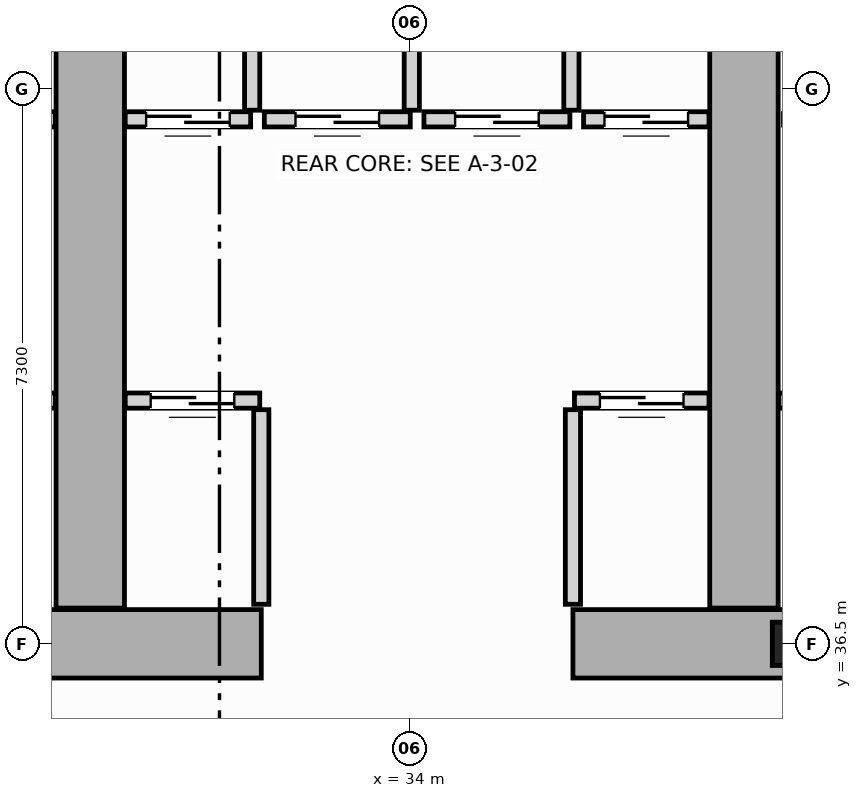
"""IFC4 building model, lengths in metres.
Left out: names, types, materials, properties, quantities, classifications, styles, units other than length and angle.
Written with IfcOpenShell. Run it as: python <this file> out.ifc"""

import sys

from ifc_helpers import new_model, si_unit, direction, frame, frame_2d, origin, origin_2d, place, context, subcontext, project, spatial, rectangle, i_section, extrude, source, transform, mapped, element, fill, save


model = new_model("IFC4")
c1 = context("Model", 3, precision=1e-05, world=origin(), true_north=direction((0.0, 1.0)))
c2 = subcontext(c1, "Body", "Model", "MODEL_VIEW")
j1 = project(units=[si_unit("LENGTHUNIT", "METRE"), si_unit("PLANEANGLEUNIT", "RADIAN")], contexts=[c1])
p1 = place(None, origin())
s1 = spatial("IfcSite", under=j1, at=p1, CompositionType="ELEMENT")
p2 = place(p1, origin())
s2 = spatial("IfcBuilding", under=s1, at=p2, CompositionType="ELEMENT")
p3 = place(p2, origin())
s3 = spatial("IfcBuildingStorey", under=s2, at=p3, CompositionType="ELEMENT", Elevation=0.0)
m1 = source(origin(), c2, "Body", "SweptSolid", [
    extrude(i_section(OverallWidth=0.454, OverallDepth=0.569, WebThickness=0.078, FlangeThickness=0.08, FilletRadius=0.015, at=origin_2d()), origin(), (0.0, 0.0, 1.0), 5.6),
])
p4 = place(p3, frame((39.0, 36.5, 0.0), z_axis=(0.0, 0.0, 1.0), x_axis=(1.0, 0.0, 0.0)))
e1 = element("IfcColumn", 1, at=p4, inside=s3, PredefinedType="COLUMN", context=c2, shape_type="MappedRepresentation", body=[
    mapped(m1, transform((0.0, 0.0, 0.0), scale=1.0)),
])
for number, where, z_axis, x_axis in (
    (2, (27.55, 36.5, 0.0), (0.0, 0.0, 1.0), (1.0, 0.0, 0.0)),
    (3, (36.15, 36.5, 0.0), (0.0, 0.0, 1.0), (1.0, 0.0, 0.0)),
):
    element("IfcWall", number, at=place(p3, frame(where, z_axis=z_axis, x_axis=x_axis)), inside=s3, PredefinedType="SHEAR", context=c2, shape_type="SweptSolid", body=[
        extrude(rectangle(XDim=4.5, YDim=0.9, at=frame_2d((2.25, 0.0))), origin(), (0.0, 0.0, 1.0), 5.6),
    ])
for number, where, z_axis, x_axis in (
    (4, (29.8, 36.97, 0.0), (0.0, 0.0, 1.0), (0.0, 1.0, 0.0)),
    (5, (38.4, 36.97, 0.0), (0.0, 0.0, 1.0), (0.0, 1.0, 0.0)),
):
    element("IfcWall", number, at=place(p3, frame(where, z_axis=z_axis, x_axis=x_axis)), inside=s3, PredefinedType="SHEAR", context=c2, shape_type="SweptSolid", body=[
        extrude(rectangle(XDim=9.23, YDim=0.9, at=frame_2d((4.615, 0.0))), origin(), (0.0, 0.0, 1.0), 5.6),
    ])
p5 = place(p3, frame((27.57, 39.7, 0.0), z_axis=(0.0, 0.0, 1.0), x_axis=(1.0, 0.0, 0.0)))
e6 = element("IfcWall", 6, at=p5, inside=s3, PredefinedType="SOLIDWALL", context=c2, shape_type="SweptSolid", body=[
    extrude(rectangle(XDim=1.77, YDim=0.2, at=frame_2d((0.885, 0.0))), origin(), (0.0, 0.0, 1.0), 5.32),
])
p6 = place(p5, frame((0.335, 0.0, 0.0)))
e7 = element("IfcOpeningElement", 7, at=p6, cuts=e6, PredefinedType="OPENING", context=c2, shape_type="SweptSolid", body=[
    extrude(rectangle(XDim=1.1, YDim=2.15, at=frame_2d((0.55, 1.075))), frame((0.0, 0.11, 0.0), z_axis=(0.0, -1.0, 0.0), x_axis=(1.0, 0.0, 0.0)), (0.0, 0.0, 1.0), 0.22),
])
p7 = place(p3, frame((27.69, 43.4, 0.0), z_axis=(0.0, 0.0, 1.0), x_axis=(1.0, 0.0, 0.0)))
e8 = element("IfcWall", 8, at=p7, inside=s3, PredefinedType="SOLIDWALL", context=c2, shape_type="SweptSolid", body=[
    extrude(rectangle(XDim=1.65, YDim=0.2, at=frame_2d((0.825, 0.0))), origin(), (0.0, 0.0, 1.0), 5.32),
])
p8 = place(p7, frame((0.275, 0.0, 0.0)))
e9 = element("IfcOpeningElement", 9, at=p8, cuts=e8, PredefinedType="OPENING", context=c2, shape_type="SweptSolid", body=[
    extrude(rectangle(XDim=1.1, YDim=2.15, at=frame_2d((0.55, 1.075))), frame((0.0, 0.11, 0.0), z_axis=(0.0, -1.0, 0.0), x_axis=(1.0, 0.0, 0.0)), (0.0, 0.0, 1.0), 0.22),
])
p9 = place(p3, frame((30.26, 39.7, 0.0), z_axis=(0.0, 0.0, 1.0), x_axis=(1.0, 0.0, 0.0)))
e10 = element("IfcWall", 10, at=p9, inside=s3, PredefinedType="SOLIDWALL", context=c2, shape_type="SweptSolid", body=[
    extrude(rectangle(XDim=1.77, YDim=0.2, at=frame_2d((0.885, 0.0))), origin(), (0.0, 0.0, 1.0), 5.32),
])
p10 = place(p9, frame((0.335, 0.0, 0.0)))
e11 = element("IfcOpeningElement", 11, at=p10, cuts=e10, PredefinedType="OPENING", context=c2, shape_type="SweptSolid", body=[
    extrude(rectangle(XDim=1.1, YDim=2.15, at=frame_2d((0.55, 1.075))), frame((0.0, 0.11, 0.0), z_axis=(0.0, -1.0, 0.0), x_axis=(1.0, 0.0, 0.0)), (0.0, 0.0, 1.0), 0.22),
])
p11 = place(p3, frame((32.05, 37.02, 0.0), z_axis=(0.0, 0.0, 1.0), x_axis=(0.0, 1.0, 0.0)))
e12 = element("IfcWall", 12, at=p11, inside=s3, PredefinedType="SOLIDWALL", context=c2, shape_type="SweptSolid", body=[
    extrude(rectangle(XDim=2.56, YDim=0.2, at=frame_2d((1.28, 0.0))), origin(), (0.0, 0.0, 1.0), 5.32),
])
p12 = place(p3, frame((36.17, 39.7, 0.0), z_axis=(0.0, 0.0, 1.0), x_axis=(1.0, 0.0, 0.0)))
e13 = element("IfcWall", 13, at=p12, inside=s3, PredefinedType="SOLIDWALL", context=c2, shape_type="SweptSolid", body=[
    extrude(rectangle(XDim=1.77, YDim=0.2, at=frame_2d((0.885, 0.0))), origin(), (0.0, 0.0, 1.0), 5.32),
])
p13 = place(p12, frame((0.335, 0.0, 0.0)))
e14 = element("IfcOpeningElement", 14, at=p13, cuts=e13, PredefinedType="OPENING", context=c2, shape_type="SweptSolid", body=[
    extrude(rectangle(XDim=1.1, YDim=2.15, at=frame_2d((0.55, 1.075))), frame((0.0, 0.11, 0.0), z_axis=(0.0, -1.0, 0.0), x_axis=(1.0, 0.0, 0.0)), (0.0, 0.0, 1.0), 0.22),
])
p14 = place(p3, frame((36.15, 37.02, 0.0), z_axis=(0.0, 0.0, 1.0), x_axis=(0.0, 1.0, 0.0)))
e15 = element("IfcWall", 15, at=p14, inside=s3, PredefinedType="SOLIDWALL", context=c2, shape_type="SweptSolid", body=[
    extrude(rectangle(XDim=2.56, YDim=0.2, at=frame_2d((1.28, 0.0))), origin(), (0.0, 0.0, 1.0), 5.32),
])
p15 = place(p3, frame((30.26, 43.4, 0.0), z_axis=(0.0, 0.0, 1.0), x_axis=(1.0, 0.0, 0.0)))
e16 = element("IfcWall", 16, at=p15, inside=s3, PredefinedType="SOLIDWALL", context=c2, shape_type="SweptSolid", body=[
    extrude(rectangle(XDim=1.65, YDim=0.2, at=frame_2d((0.825, 0.0))), origin(), (0.0, 0.0, 1.0), 5.32),
])
p16 = place(p15, frame((0.275, 0.0, 0.0)))
e17 = element("IfcOpeningElement", 17, at=p16, cuts=e16, PredefinedType="OPENING", context=c2, shape_type="SweptSolid", body=[
    extrude(rectangle(XDim=1.1, YDim=2.15, at=frame_2d((0.55, 1.075))), frame((0.0, 0.11, 0.0), z_axis=(0.0, -1.0, 0.0), x_axis=(1.0, 0.0, 0.0)), (0.0, 0.0, 1.0), 0.22),
])
p17 = place(p3, frame((31.93, 43.52, 0.0), z_axis=(0.0, 0.0, 1.0), x_axis=(0.0, 1.0, 0.0)))
e18 = element("IfcWall", 18, at=p17, inside=s3, PredefinedType="SOLIDWALL", context=c2, shape_type="SweptSolid", body=[
    extrude(rectangle(XDim=2.56, YDim=0.2, at=frame_2d((1.28, 0.0))), origin(), (0.0, 0.0, 1.0), 5.32),
])
p18 = place(p3, frame((32.09, 43.4, 0.0), z_axis=(0.0, 0.0, 1.0), x_axis=(1.0, 0.0, 0.0)))
e19 = element("IfcWall", 19, at=p18, inside=s3, PredefinedType="SOLIDWALL", context=c2, shape_type="SweptSolid", body=[
    extrude(rectangle(XDim=1.92, YDim=0.2, at=frame_2d((0.96, 0.0))), origin(), (0.0, 0.0, 1.0), 5.32),
])
p19 = place(p18, frame((0.41, 0.0, 0.0)))
e20 = element("IfcOpeningElement", 20, at=p19, cuts=e19, PredefinedType="OPENING", context=c2, shape_type="SweptSolid", body=[
    extrude(rectangle(XDim=1.1, YDim=2.15, at=frame_2d((0.55, 1.075))), frame((0.0, 0.11, 0.0), z_axis=(0.0, -1.0, 0.0), x_axis=(1.0, 0.0, 0.0)), (0.0, 0.0, 1.0), 0.22),
])
p20 = place(p3, frame((34.03, 43.52, 0.0), z_axis=(0.0, 0.0, 1.0), x_axis=(0.0, 1.0, 0.0)))
e21 = element("IfcWall", 21, at=p20, inside=s3, PredefinedType="SOLIDWALL", context=c2, shape_type="SweptSolid", body=[
    extrude(rectangle(XDim=2.56, YDim=0.2, at=frame_2d((1.28, 0.0))), origin(), (0.0, 0.0, 1.0), 5.32),
])
p21 = place(p3, frame((34.19, 43.4, 0.0), z_axis=(0.0, 0.0, 1.0), x_axis=(1.0, 0.0, 0.0)))
e22 = element("IfcWall", 22, at=p21, inside=s3, PredefinedType="SOLIDWALL", context=c2, shape_type="SweptSolid", body=[
    extrude(rectangle(XDim=1.92, YDim=0.2, at=frame_2d((0.96, 0.0))), origin(), (0.0, 0.0, 1.0), 5.32),
])
p22 = place(p21, frame((0.41, 0.0, 0.0)))
e23 = element("IfcOpeningElement", 23, at=p22, cuts=e22, PredefinedType="OPENING", context=c2, shape_type="SweptSolid", body=[
    extrude(rectangle(XDim=1.1, YDim=2.15, at=frame_2d((0.55, 1.075))), frame((0.0, 0.11, 0.0), z_axis=(0.0, -1.0, 0.0), x_axis=(1.0, 0.0, 0.0)), (0.0, 0.0, 1.0), 0.22),
])
p23 = place(p3, frame((36.13, 43.52, 0.0), z_axis=(0.0, 0.0, 1.0), x_axis=(0.0, 1.0, 0.0)))
e24 = element("IfcWall", 24, at=p23, inside=s3, PredefinedType="SOLIDWALL", context=c2, shape_type="SweptSolid", body=[
    extrude(rectangle(XDim=2.56, YDim=0.2, at=frame_2d((1.28, 0.0))), origin(), (0.0, 0.0, 1.0), 5.32),
])
p24 = place(p3, frame((36.29, 43.4, 0.0), z_axis=(0.0, 0.0, 1.0), x_axis=(1.0, 0.0, 0.0)))
e25 = element("IfcWall", 25, at=p24, inside=s3, PredefinedType="SOLIDWALL", context=c2, shape_type="SweptSolid", body=[
    extrude(rectangle(XDim=1.65, YDim=0.2, at=frame_2d((0.825, 0.0))), origin(), (0.0, 0.0, 1.0), 5.32),
])
p25 = place(p24, frame((0.275, 0.0, 0.0)))
e26 = element("IfcOpeningElement", 26, at=p25, cuts=e25, PredefinedType="OPENING", context=c2, shape_type="SweptSolid", body=[
    extrude(rectangle(XDim=1.1, YDim=2.15, at=frame_2d((0.55, 1.075))), frame((0.0, 0.11, 0.0), z_axis=(0.0, -1.0, 0.0), x_axis=(1.0, 0.0, 0.0)), (0.0, 0.0, 1.0), 0.22),
])
p26 = place(p3, frame((38.86, 39.7, 0.0), z_axis=(0.0, 0.0, 1.0), x_axis=(1.0, 0.0, 0.0)))
e27 = element("IfcWall", 27, at=p26, inside=s3, PredefinedType="SOLIDWALL", context=c2, shape_type="SweptSolid", body=[
    extrude(rectangle(XDim=1.77, YDim=0.2, at=frame_2d((0.885, 0.0))), origin(), (0.0, 0.0, 1.0), 5.32),
])
p27 = place(p26, frame((0.335, 0.0, 0.0)))
e28 = element("IfcOpeningElement", 28, at=p27, cuts=e27, PredefinedType="OPENING", context=c2, shape_type="SweptSolid", body=[
    extrude(rectangle(XDim=1.1, YDim=2.15, at=frame_2d((0.55, 1.075))), frame((0.0, 0.11, 0.0), z_axis=(0.0, -1.0, 0.0), x_axis=(1.0, 0.0, 0.0)), (0.0, 0.0, 1.0), 0.22),
])
m2 = source(origin(), c2, "Body", "SweptSolid", [
    extrude(rectangle(XDim=1.1, YDim=2.15, at=frame_2d((0.55, 1.075))), frame((0.0, 0.025, 0.0), z_axis=(0.0, -1.0, 0.0), x_axis=(1.0, 0.0, 0.0)), (0.0, 0.0, 1.0), 0.05),
])
p28 = place(p10, origin())
e29 = element("IfcDoor", 29, at=p28, inside=s3, OperationType="DOUBLE_DOOR_SLIDING", PredefinedType="DOOR", context=c2, shape_type="MappedRepresentation", body=[
    mapped(m2, transform((0.0, 0.0, 0.0), scale=1.0)),
])
fill(e11, e29)
p29 = place(p13, origin())
e30 = element("IfcDoor", 30, at=p29, inside=s3, OperationType="DOUBLE_DOOR_SLIDING", PredefinedType="DOOR", context=c2, shape_type="MappedRepresentation", body=[
    mapped(m2, transform((0.0, 0.0, 0.0), scale=1.0)),
])
fill(e14, e30)
p30 = place(p16, origin())
e31 = element("IfcDoor", 31, at=p30, inside=s3, OperationType="DOUBLE_DOOR_SLIDING", PredefinedType="DOOR", context=c2, shape_type="MappedRepresentation", body=[
    mapped(m2, transform((0.0, 0.0, 0.0), scale=1.0)),
])
fill(e17, e31)
p31 = place(p19, origin())
e32 = element("IfcDoor", 32, at=p31, inside=s3, OperationType="DOUBLE_DOOR_SLIDING", PredefinedType="DOOR", context=c2, shape_type="MappedRepresentation", body=[
    mapped(m2, transform((0.0, 0.0, 0.0), scale=1.0)),
])
fill(e20, e32)
p32 = place(p22, origin())
e33 = element("IfcDoor", 33, at=p32, inside=s3, OperationType="DOUBLE_DOOR_SLIDING", PredefinedType="DOOR", context=c2, shape_type="MappedRepresentation", body=[
    mapped(m2, transform((0.0, 0.0, 0.0), scale=1.0)),
])
fill(e23, e33)
p33 = place(p25, origin())
e34 = element("IfcDoor", 34, at=p33, inside=s3, OperationType="DOUBLE_DOOR_SLIDING", PredefinedType="DOOR", context=c2, shape_type="MappedRepresentation", body=[
    mapped(m2, transform((0.0, 0.0, 0.0), scale=1.0)),
])
fill(e26, e34)
save(model, sys.argv[1])
